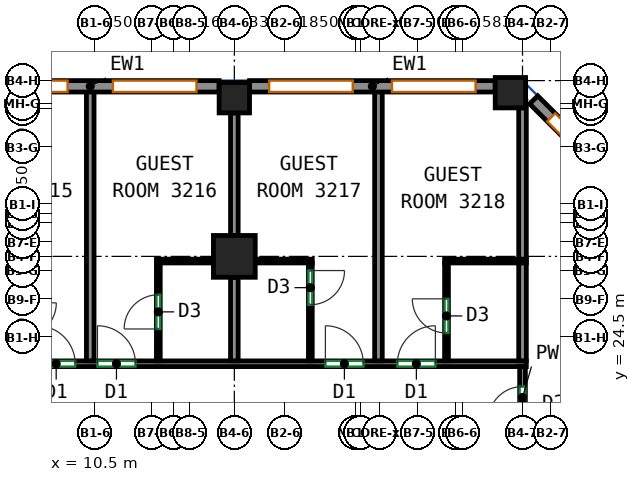
"""IFC4 building model, lengths in metres.
Left out: names, types, materials, properties, quantities, classifications, styles, units other than length and angle.
Written with IfcOpenShell. Run it as: python <this file> out.ifc"""

import sys

from ifc_helpers import new_model, si_unit, direction, frame, frame_2d, origin, origin_2d, place, context, subcontext, project, spatial, rectangle, extrude, source, transform, mapped, element, fill, save


model = new_model("IFC4")
c1 = context("Model", 3, precision=1e-05, world=origin(), true_north=direction((0.0, 1.0)))
c2 = subcontext(c1, "Body", "Model", "MODEL_VIEW")
j1 = project(units=[si_unit("LENGTHUNIT", "METRE"), si_unit("PLANEANGLEUNIT", "RADIAN")], contexts=[c1])
p1 = place(None, origin())
s1 = spatial("IfcSite", under=j1, at=p1, CompositionType="ELEMENT")
p2 = place(p1, origin())
s2 = spatial("IfcBuilding", under=s1, at=p2, CompositionType="ELEMENT")
p3 = place(p2, frame((0.0, 0.0, 143.9)))
s3 = spatial("IfcBuildingStorey", under=s2, at=p3, CompositionType="ELEMENT", Elevation=143.9)
m1 = source(origin(), c2, "Body", "SweptSolid", [
    extrude(rectangle(XDim=1.1, YDim=1.1, at=origin_2d()), origin(), (0.0, 0.0, 1.0), 3.12),
])
p4 = place(p3, frame((14.167, 26.625, 0.0), z_axis=(0.0, 0.0, 1.0), x_axis=(1.0, 0.0, 0.0)))
e1 = element("IfcColumn", 1, at=p4, inside=s3, PredefinedType="COLUMN", context=c2, shape_type="MappedRepresentation", body=[
    mapped(m1, transform((0.0, 0.0, 0.0))),
])
m2 = source(origin(), c2, "Body", "SweptSolid", [
    extrude(rectangle(XDim=0.8, YDim=0.8, at=origin_2d()), origin(), (0.0, 0.0, 1.0), 3.12),
])
for number, where, z_axis, x_axis in (
    (2, (14.167, 30.8, 0.0), (0.0, 0.0, 1.0), (1.0, 0.0, 0.0)),
    (3, (21.432, 30.932, 0.0), (0.0, 0.0, 1.0), (1.0, 0.0, 0.0)),
):
    element("IfcColumn", number, at=place(p3, frame(where, z_axis=z_axis, x_axis=x_axis)), inside=s3, PredefinedType="COLUMN", context=c2, shape_type="MappedRepresentation", body=[
        mapped(m2, transform((0.0, 0.0, 0.0))),
    ])
m3 = source(origin(), c2, "Body", "SweptSolid", [
    extrude(rectangle(XDim=3.5, YDim=0.3, at=frame_2d((1.75, 0.0))), origin(), (0.0, 0.0, 1.0), 3.12),
])
p5 = place(p3, frame((24.519, 28.269, 0.0), z_axis=(0.0, 0.0, 1.0), x_axis=(-0.70707190453, 0.707141656123, 0.0)))
e4 = element("IfcWall", 4, at=p5, inside=s3, PredefinedType="SOLIDWALL", context=c2, shape_type="MappedRepresentation", body=[
    mapped(m3, transform((0.0, 0.0, 0.0))),
])
p6 = place(p5, frame((0.65, 0.0, 0.85)))
e5 = element("IfcOpeningElement", 5, at=p6, cuts=e4, PredefinedType="OPENING", context=c2, shape_type="SweptSolid", body=[
    extrude(rectangle(XDim=2.2, YDim=1.95, at=frame_2d((1.1, 0.975))), frame((0.0, 0.16, 0.0), z_axis=(0.0, -1.0, 0.0), x_axis=(1.0, 0.0, 0.0)), (0.0, 0.0, 1.0), 0.32),
])
m4 = source(origin(), c2, "Body", "SweptSolid", [
    extrude(rectangle(XDim=6.465, YDim=0.3, at=frame_2d((3.232, 0.0))), origin(), (0.0, 0.0, 1.0), 3.12),
])
p7 = place(p3, frame((21.032, 31.1, 0.0), z_axis=(0.0, 0.0, 1.0), x_axis=(-1.0, 0.0, 0.0)))
e6 = element("IfcWall", 6, at=p7, inside=s3, PredefinedType="SOLIDWALL", context=c2, shape_type="MappedRepresentation", body=[
    mapped(m4, transform((0.0, 0.0, 0.0))),
])
p8 = place(p7, frame((0.516, 0.0, 0.85)))
e7 = element("IfcOpeningElement", 7, at=p8, cuts=e6, PredefinedType="OPENING", context=c2, shape_type="SweptSolid", body=[
    extrude(rectangle(XDim=2.2, YDim=1.95, at=frame_2d((1.1, 0.975))), frame((0.0, 0.16, 0.0), z_axis=(0.0, -1.0, 0.0), x_axis=(1.0, 0.0, 0.0)), (0.0, 0.0, 1.0), 0.32),
])
p9 = place(p7, frame((3.749, 0.0, 0.85)))
e8 = element("IfcOpeningElement", 8, at=p9, cuts=e6, PredefinedType="OPENING", context=c2, shape_type="SweptSolid", body=[
    extrude(rectangle(XDim=2.2, YDim=1.95, at=frame_2d((1.1, 0.975))), frame((0.0, 0.16, 0.0), z_axis=(0.0, -1.0, 0.0), x_axis=(1.0, 0.0, 0.0)), (0.0, 0.0, 1.0), 0.32),
])
m5 = source(origin(), c2, "Body", "SweptSolid", [
    extrude(rectangle(XDim=6.783, YDim=0.3, at=frame_2d((3.392, 0.0))), origin(), (0.0, 0.0, 1.0), 3.12),
])
p10 = place(p3, frame((13.767, 31.1, 0.0), z_axis=(0.0, 0.0, 1.0), x_axis=(-1.0, 0.0, 0.0)))
e9 = element("IfcWall", 9, at=p10, inside=s3, PredefinedType="SOLIDWALL", context=c2, shape_type="MappedRepresentation", body=[
    mapped(m5, transform((0.0, 0.0, 0.0))),
])
p11 = place(p10, frame((0.596, 0.0, 0.85)))
e10 = element("IfcOpeningElement", 10, at=p11, cuts=e9, PredefinedType="OPENING", context=c2, shape_type="SweptSolid", body=[
    extrude(rectangle(XDim=2.2, YDim=1.95, at=frame_2d((1.1, 0.975))), frame((0.0, 0.16, 0.0), z_axis=(0.0, -1.0, 0.0), x_axis=(1.0, 0.0, 0.0)), (0.0, 0.0, 1.0), 0.32),
])
p12 = place(p10, frame((3.988, 0.0, 0.85)))
e11 = element("IfcOpeningElement", 11, at=p12, cuts=e9, PredefinedType="OPENING", context=c2, shape_type="SweptSolid", body=[
    extrude(rectangle(XDim=2.2, YDim=1.95, at=frame_2d((1.1, 0.975))), frame((0.0, 0.16, 0.0), z_axis=(0.0, -1.0, 0.0), x_axis=(1.0, 0.0, 0.0)), (0.0, 0.0, 1.0), 0.32),
])
p13 = place(p3, frame((-20.059, 23.8, 0.0), z_axis=(0.0, 0.0, 1.0), x_axis=(1.0, 0.0, 0.0)))
e12 = element("IfcWall", 12, at=p13, inside=s3, PredefinedType="PARTITIONING", context=c2, shape_type="SweptSolid", body=[
    extrude(rectangle(XDim=41.909, YDim=0.15, at=frame_2d((20.955, 0.0))), origin(), (0.0, 0.0, 1.0), 3.12),
])
p14 = place(p13, frame((0.401, 0.0, 0.0)))
e13 = element("IfcOpeningElement", 13, at=p14, cuts=e12, PredefinedType="OPENING", context=c2, shape_type="SweptSolid", body=[
    extrude(rectangle(XDim=1.0, YDim=2.1, at=frame_2d((0.5, 1.05))), frame((0.0, 0.085, 0.0), z_axis=(0.0, -1.0, 0.0), x_axis=(1.0, 0.0, 0.0)), (0.0, 0.0, 1.0), 0.17),
])
p15 = place(p13, frame((6.082, 0.0, 0.0)))
e14 = element("IfcOpeningElement", 14, at=p15, cuts=e12, PredefinedType="OPENING", context=c2, shape_type="SweptSolid", body=[
    extrude(rectangle(XDim=1.0, YDim=2.1, at=frame_2d((0.5, 1.05))), frame((0.0, 0.085, 0.0), z_axis=(0.0, -1.0, 0.0), x_axis=(1.0, 0.0, 0.0)), (0.0, 0.0, 1.0), 0.17),
])
p16 = place(p13, frame((8.08, 0.0, 0.0)))
e15 = element("IfcOpeningElement", 15, at=p16, cuts=e12, PredefinedType="OPENING", context=c2, shape_type="SweptSolid", body=[
    extrude(rectangle(XDim=1.0, YDim=2.1, at=frame_2d((0.5, 1.05))), frame((0.0, 0.085, 0.0), z_axis=(0.0, -1.0, 0.0), x_axis=(1.0, 0.0, 0.0)), (0.0, 0.0, 1.0), 0.17),
])
p17 = place(p13, frame((13.769, 0.0, 0.0)))
e16 = element("IfcOpeningElement", 16, at=p17, cuts=e12, PredefinedType="OPENING", context=c2, shape_type="SweptSolid", body=[
    extrude(rectangle(XDim=1.0, YDim=2.1, at=frame_2d((0.5, 1.05))), frame((0.0, 0.085, 0.0), z_axis=(0.0, -1.0, 0.0), x_axis=(1.0, 0.0, 0.0)), (0.0, 0.0, 1.0), 0.17),
])
p18 = place(p13, frame((15.56, 0.0, 0.0)))
e17 = element("IfcOpeningElement", 17, at=p18, cuts=e12, PredefinedType="OPENING", context=c2, shape_type="SweptSolid", body=[
    extrude(rectangle(XDim=1.0, YDim=2.1, at=frame_2d((0.5, 1.05))), frame((0.0, 0.085, 0.0), z_axis=(0.0, -1.0, 0.0), x_axis=(1.0, 0.0, 0.0)), (0.0, 0.0, 1.0), 0.17),
])
p19 = place(p13, frame((21.625, 0.0, 0.0)))
e18 = element("IfcOpeningElement", 18, at=p19, cuts=e12, PredefinedType="OPENING", context=c2, shape_type="SweptSolid", body=[
    extrude(rectangle(XDim=1.0, YDim=2.1, at=frame_2d((0.5, 1.05))), frame((0.0, 0.085, 0.0), z_axis=(0.0, -1.0, 0.0), x_axis=(1.0, 0.0, 0.0)), (0.0, 0.0, 1.0), 0.17),
])
p20 = place(p13, frame((23.212, 0.0, 0.0)))
e19 = element("IfcOpeningElement", 19, at=p20, cuts=e12, PredefinedType="OPENING", context=c2, shape_type="SweptSolid", body=[
    extrude(rectangle(XDim=1.0, YDim=2.1, at=frame_2d((0.5, 1.05))), frame((0.0, 0.085, 0.0), z_axis=(0.0, -1.0, 0.0), x_axis=(1.0, 0.0, 0.0)), (0.0, 0.0, 1.0), 0.17),
])
p21 = place(p13, frame((29.038, 0.0, 0.0)))
e20 = element("IfcOpeningElement", 20, at=p21, cuts=e12, PredefinedType="OPENING", context=c2, shape_type="SweptSolid", body=[
    extrude(rectangle(XDim=1.0, YDim=2.1, at=frame_2d((0.5, 1.05))), frame((0.0, 0.085, 0.0), z_axis=(0.0, -1.0, 0.0), x_axis=(1.0, 0.0, 0.0)), (0.0, 0.0, 1.0), 0.17),
])
p22 = place(p13, frame((30.624, 0.0, 0.0)))
e21 = element("IfcOpeningElement", 21, at=p22, cuts=e12, PredefinedType="OPENING", context=c2, shape_type="SweptSolid", body=[
    extrude(rectangle(XDim=1.0, YDim=2.1, at=frame_2d((0.5, 1.05))), frame((0.0, 0.085, 0.0), z_axis=(0.0, -1.0, 0.0), x_axis=(1.0, 0.0, 0.0)), (0.0, 0.0, 1.0), 0.17),
])
p23 = place(p13, frame((36.622, 0.0, 0.0)))
e22 = element("IfcOpeningElement", 22, at=p23, cuts=e12, PredefinedType="OPENING", context=c2, shape_type="SweptSolid", body=[
    extrude(rectangle(XDim=1.0, YDim=2.1, at=frame_2d((0.5, 1.05))), frame((0.0, 0.085, 0.0), z_axis=(0.0, -1.0, 0.0), x_axis=(1.0, 0.0, 0.0)), (0.0, 0.0, 1.0), 0.17),
])
p24 = place(p13, frame((38.516, 0.0, 0.0)))
e23 = element("IfcOpeningElement", 23, at=p24, cuts=e12, PredefinedType="OPENING", context=c2, shape_type="SweptSolid", body=[
    extrude(rectangle(XDim=1.0, YDim=2.1, at=frame_2d((0.5, 1.05))), frame((0.0, 0.085, 0.0), z_axis=(0.0, -1.0, 0.0), x_axis=(1.0, 0.0, 0.0)), (0.0, 0.0, 1.0), 0.17),
])
p25 = place(p3, frame((21.75, 22.1, 0.0), z_axis=(0.0, 0.0, 1.0), x_axis=(0.0, 1.0, 0.0)))
e24 = element("IfcWall", 24, at=p25, inside=s3, PredefinedType="PARTITIONING", context=c2, shape_type="SweptSolid", body=[
    extrude(rectangle(XDim=1.625, YDim=0.15, at=frame_2d((0.812, 0.0))), origin(), (0.0, 0.0, 1.0), 3.12),
])
p26 = place(p25, frame((0.2, 0.0, 0.0)))
e25 = element("IfcOpeningElement", 25, at=p26, cuts=e24, PredefinedType="OPENING", context=c2, shape_type="SweptSolid", body=[
    extrude(rectangle(XDim=0.9, YDim=2.1, at=frame_2d((0.45, 1.05))), frame((0.0, 0.085, 0.0), z_axis=(0.0, -1.0, 0.0), x_axis=(1.0, 0.0, 0.0)), (0.0, 0.0, 1.0), 0.17),
])
p27 = place(p3, frame((10.375, 23.877, 0.0), z_axis=(0.0, 0.0, 1.0), x_axis=(0.0, 1.0, 0.0)))
e26 = element("IfcWall", 26, at=p27, inside=s3, PredefinedType="PARTITIONING", context=c2, shape_type="SweptSolid", body=[
    extrude(rectangle(XDim=7.123, YDim=0.2, at=frame_2d((3.562, 0.0))), origin(), (0.0, 0.0, 1.0), 3.12),
])
p28 = place(p3, frame((12.117, 26.502, 0.0), z_axis=(0.0, 0.0, 1.0), x_axis=(1.0, 0.0, 0.0)))
e27 = element("IfcWall", 27, at=p28, inside=s3, PredefinedType="PARTITIONING", context=c2, shape_type="SweptSolid", body=[
    extrude(rectangle(XDim=1.5, YDim=0.1, at=frame_2d((0.75, 0.0))), origin(), (0.0, 0.0, 1.0), 3.12),
])
p29 = place(p3, frame((12.167, 23.877, 0.0), z_axis=(0.0, 0.0, 1.0), x_axis=(0.0, 1.0, 0.0)))
e28 = element("IfcWall", 28, at=p29, inside=s3, PredefinedType="PARTITIONING", context=c2, shape_type="SweptSolid", body=[
    extrude(rectangle(XDim=2.575, YDim=0.1, at=frame_2d((1.288, 0.0))), origin(), (0.0, 0.0, 1.0), 3.12),
])
p30 = place(p29, frame((0.838, 0.0, 0.0)))
e29 = element("IfcOpeningElement", 29, at=p30, cuts=e28, PredefinedType="OPENING", context=c2, shape_type="SweptSolid", body=[
    extrude(rectangle(XDim=0.9, YDim=2.1, at=frame_2d((0.45, 1.05))), frame((0.0, 0.06, 0.0), z_axis=(0.0, -1.0, 0.0), x_axis=(1.0, 0.0, 0.0)), (0.0, 0.0, 1.0), 0.12),
])
p31 = place(p3, frame((14.167, 27.175, 0.0), z_axis=(0.0, 0.0, 1.0), x_axis=(0.0, 1.0, 0.0)))
e30 = element("IfcWall", 30, at=p31, inside=s3, PredefinedType="PARTITIONING", context=c2, shape_type="SweptSolid", body=[
    extrude(rectangle(XDim=3.225, YDim=0.2, at=frame_2d((1.612, 0.0))), origin(), (0.0, 0.0, 1.0), 3.12),
])
p32 = place(p3, frame((14.167, 23.877, 0.0), z_axis=(0.0, 0.0, 1.0), x_axis=(0.0, 1.0, 0.0)))
e31 = element("IfcWall", 31, at=p32, inside=s3, PredefinedType="PARTITIONING", context=c2, shape_type="SweptSolid", body=[
    extrude(rectangle(XDim=2.198, YDim=0.2, at=frame_2d((1.099, 0.0))), origin(), (0.0, 0.0, 1.0), 3.12),
])
p33 = place(p3, frame((14.717, 26.502, 0.0), z_axis=(0.0, 0.0, 1.0), x_axis=(1.0, 0.0, 0.0)))
e32 = element("IfcWall", 32, at=p33, inside=s3, PredefinedType="PARTITIONING", context=c2, shape_type="SweptSolid", body=[
    extrude(rectangle(XDim=1.5, YDim=0.1, at=frame_2d((0.75, 0.0))), origin(), (0.0, 0.0, 1.0), 3.12),
])
p34 = place(p3, frame((16.167, 26.452, 0.0), z_axis=(0.0, 0.0, 1.0), x_axis=(0.0, -1.0, 0.0)))
e33 = element("IfcWall", 33, at=p34, inside=s3, PredefinedType="PARTITIONING", context=c2, shape_type="SweptSolid", body=[
    extrude(rectangle(XDim=2.575, YDim=0.1, at=frame_2d((1.288, 0.0))), origin(), (0.0, 0.0, 1.0), 3.12),
])
p35 = place(p34, frame((0.2, 0.0, 0.0)))
e34 = element("IfcOpeningElement", 34, at=p35, cuts=e33, PredefinedType="OPENING", context=c2, shape_type="SweptSolid", body=[
    extrude(rectangle(XDim=0.9, YDim=2.1, at=frame_2d((0.45, 1.05))), frame((0.0, 0.06, 0.0), z_axis=(0.0, -1.0, 0.0), x_axis=(1.0, 0.0, 0.0)), (0.0, 0.0, 1.0), 0.12),
])
p36 = place(p3, frame((17.959, 23.877, 0.0), z_axis=(0.0, 0.0, 1.0), x_axis=(0.0, 1.0, 0.0)))
e35 = element("IfcWall", 35, at=p36, inside=s3, PredefinedType="PARTITIONING", context=c2, shape_type="SweptSolid", body=[
    extrude(rectangle(XDim=7.123, YDim=0.2, at=frame_2d((3.562, 0.0))), origin(), (0.0, 0.0, 1.0), 3.12),
])
p37 = place(p3, frame((19.7, 26.502, 0.0), z_axis=(0.0, 0.0, 1.0), x_axis=(1.0, 0.0, 0.0)))
e36 = element("IfcWall", 36, at=p37, inside=s3, PredefinedType="PARTITIONING", context=c2, shape_type="SweptSolid", body=[
    extrude(rectangle(XDim=2.15, YDim=0.1, at=frame_2d((1.075, 0.0))), origin(), (0.0, 0.0, 1.0), 3.12),
])
p38 = place(p3, frame((19.75, 23.877, 0.0), z_axis=(0.0, 0.0, 1.0), x_axis=(0.0, 1.0, 0.0)))
e37 = element("IfcWall", 37, at=p38, inside=s3, PredefinedType="PARTITIONING", context=c2, shape_type="SweptSolid", body=[
    extrude(rectangle(XDim=2.575, YDim=0.1, at=frame_2d((1.288, 0.0))), origin(), (0.0, 0.0, 1.0), 3.12),
])
p39 = place(p38, frame((0.731, 0.0, 0.0)))
e38 = element("IfcOpeningElement", 38, at=p39, cuts=e37, PredefinedType="OPENING", context=c2, shape_type="SweptSolid", body=[
    extrude(rectangle(XDim=0.9, YDim=2.1, at=frame_2d((0.45, 1.05))), frame((0.0, 0.06, 0.0), z_axis=(0.0, -1.0, 0.0), x_axis=(1.0, 0.0, 0.0)), (0.0, 0.0, 1.0), 0.12),
])
p40 = place(p3, frame((21.75, 26.552, 0.0), z_axis=(0.0, 0.0, 1.0), x_axis=(0.0, 1.0, 0.0)))
e39 = element("IfcWall", 39, at=p40, inside=s3, PredefinedType="PARTITIONING", context=c2, shape_type="SweptSolid", body=[
    extrude(rectangle(XDim=3.98, YDim=0.2, at=frame_2d((1.99, 0.0))), origin(), (0.0, 0.0, 1.0), 3.12),
])
p41 = place(p3, frame((21.75, 23.877, 0.0), z_axis=(0.0, 0.0, 1.0), x_axis=(0.0, 1.0, 0.0)))
e40 = element("IfcWall", 40, at=p41, inside=s3, PredefinedType="PARTITIONING", context=c2, shape_type="SweptSolid", body=[
    extrude(rectangle(XDim=2.575, YDim=0.2, at=frame_2d((1.288, 0.0))), origin(), (0.0, 0.0, 1.0), 3.12),
])
p42 = place(p6, origin())
e41 = element("IfcWindow", 41, at=p42, inside=s3, PartitioningType="SINGLE_PANEL", PredefinedType="WINDOW", context=c2, shape_type="SweptSolid", body=[
    extrude(rectangle(XDim=2.2, YDim=1.95, at=frame_2d((1.1, 0.975))), frame((0.0, 0.03, 0.0), z_axis=(0.0, -1.0, 0.0), x_axis=(1.0, 0.0, 0.0)), (0.0, 0.0, 1.0), 0.06),
])
fill(e5, e41)
p43 = place(p8, origin())
e42 = element("IfcWindow", 42, at=p43, inside=s3, PartitioningType="SINGLE_PANEL", PredefinedType="WINDOW", context=c2, shape_type="SweptSolid", body=[
    extrude(rectangle(XDim=2.2, YDim=1.95, at=frame_2d((1.1, 0.975))), frame((0.0, 0.03, 0.0), z_axis=(0.0, -1.0, 0.0), x_axis=(1.0, 0.0, 0.0)), (0.0, 0.0, 1.0), 0.06),
])
fill(e7, e42)
p44 = place(p9, origin())
e43 = element("IfcWindow", 43, at=p44, inside=s3, PartitioningType="SINGLE_PANEL", PredefinedType="WINDOW", context=c2, shape_type="SweptSolid", body=[
    extrude(rectangle(XDim=2.2, YDim=1.95, at=frame_2d((1.1, 0.975))), frame((0.0, 0.03, 0.0), z_axis=(0.0, -1.0, 0.0), x_axis=(1.0, 0.0, 0.0)), (0.0, 0.0, 1.0), 0.06),
])
fill(e8, e43)
p45 = place(p11, origin())
e44 = element("IfcWindow", 44, at=p45, inside=s3, PartitioningType="SINGLE_PANEL", PredefinedType="WINDOW", context=c2, shape_type="SweptSolid", body=[
    extrude(rectangle(XDim=2.2, YDim=1.95, at=frame_2d((1.1, 0.975))), frame((0.0, 0.03, 0.0), z_axis=(0.0, -1.0, 0.0), x_axis=(1.0, 0.0, 0.0)), (0.0, 0.0, 1.0), 0.06),
])
fill(e10, e44)
p46 = place(p12, origin())
e45 = element("IfcWindow", 45, at=p46, inside=s3, PartitioningType="SINGLE_PANEL", PredefinedType="WINDOW", context=c2, shape_type="SweptSolid", body=[
    extrude(rectangle(XDim=2.2, YDim=1.95, at=frame_2d((1.1, 0.975))), frame((0.0, 0.03, 0.0), z_axis=(0.0, -1.0, 0.0), x_axis=(1.0, 0.0, 0.0)), (0.0, 0.0, 1.0), 0.06),
])
fill(e11, e45)
p47 = place(p26, origin())
e46 = element("IfcDoor", 46, at=p47, inside=s3, OperationType="SINGLE_SWING_LEFT", PredefinedType="DOOR", context=c2, shape_type="SweptSolid", body=[
    extrude(rectangle(XDim=0.9, YDim=2.1, at=frame_2d((0.45, 1.05))), frame((0.0, 0.025, 0.0), z_axis=(0.0, -1.0, 0.0), x_axis=(1.0, 0.0, 0.0)), (0.0, 0.0, 1.0), 0.05),
])
fill(e25, e46)
p48 = place(p21, origin())
e47 = element("IfcDoor", 47, at=p48, inside=s3, OperationType="SINGLE_SWING_LEFT", PredefinedType="DOOR", context=c2, shape_type="SweptSolid", body=[
    extrude(rectangle(XDim=1.0, YDim=2.1, at=frame_2d((0.5, 1.05))), frame((0.0, 0.025, 0.0), z_axis=(0.0, -1.0, 0.0), x_axis=(1.0, 0.0, 0.0)), (0.0, 0.0, 1.0), 0.05),
])
fill(e20, e47)
p49 = place(p22, origin())
e48 = element("IfcDoor", 48, at=p49, inside=s3, OperationType="SINGLE_SWING_LEFT", PredefinedType="DOOR", context=c2, shape_type="SweptSolid", body=[
    extrude(rectangle(XDim=1.0, YDim=2.1, at=frame_2d((0.5, 1.05))), frame((0.0, 0.025, 0.0), z_axis=(0.0, -1.0, 0.0), x_axis=(1.0, 0.0, 0.0)), (0.0, 0.0, 1.0), 0.05),
])
fill(e21, e48)
p50 = place(p23, origin())
e49 = element("IfcDoor", 49, at=p50, inside=s3, OperationType="SINGLE_SWING_LEFT", PredefinedType="DOOR", context=c2, shape_type="SweptSolid", body=[
    extrude(rectangle(XDim=1.0, YDim=2.1, at=frame_2d((0.5, 1.05))), frame((0.0, 0.025, 0.0), z_axis=(0.0, -1.0, 0.0), x_axis=(1.0, 0.0, 0.0)), (0.0, 0.0, 1.0), 0.05),
])
fill(e22, e49)
p51 = place(p24, origin())
e50 = element("IfcDoor", 50, at=p51, inside=s3, OperationType="SINGLE_SWING_RIGHT", PredefinedType="DOOR", context=c2, shape_type="SweptSolid", body=[
    extrude(rectangle(XDim=1.0, YDim=2.1, at=frame_2d((0.5, 1.05))), frame((0.0, 0.025, 0.0), z_axis=(0.0, -1.0, 0.0), x_axis=(1.0, 0.0, 0.0)), (0.0, 0.0, 1.0), 0.05),
])
fill(e23, e50)
p52 = place(p39, origin())
e51 = element("IfcDoor", 51, at=p52, inside=s3, OperationType="SINGLE_SWING_RIGHT", PredefinedType="DOOR", context=c2, shape_type="SweptSolid", body=[
    extrude(rectangle(XDim=0.9, YDim=2.1, at=frame_2d((0.45, 1.05))), frame((0.0, 0.025, 0.0), z_axis=(0.0, -1.0, 0.0), x_axis=(1.0, 0.0, 0.0)), (0.0, 0.0, 1.0), 0.05),
])
fill(e38, e51)
p53 = place(p30, origin())
e52 = element("IfcDoor", 52, at=p53, inside=s3, OperationType="SINGLE_SWING_LEFT", PredefinedType="DOOR", context=c2, shape_type="SweptSolid", body=[
    extrude(rectangle(XDim=0.9, YDim=2.1, at=frame_2d((0.45, 1.05))), frame((0.0, 0.025, 0.0), z_axis=(0.0, -1.0, 0.0), x_axis=(1.0, 0.0, 0.0)), (0.0, 0.0, 1.0), 0.05),
])
fill(e29, e52)
p54 = place(p35, origin())
e53 = element("IfcDoor", 53, at=p54, inside=s3, OperationType="SINGLE_SWING_LEFT", PredefinedType="DOOR", context=c2, shape_type="SweptSolid", body=[
    extrude(rectangle(XDim=0.9, YDim=2.1, at=frame_2d((0.45, 1.05))), frame((0.0, 0.025, 0.0), z_axis=(0.0, -1.0, 0.0), x_axis=(1.0, 0.0, 0.0)), (0.0, 0.0, 1.0), 0.05),
])
fill(e34, e53)
save(model, sys.argv[1])
